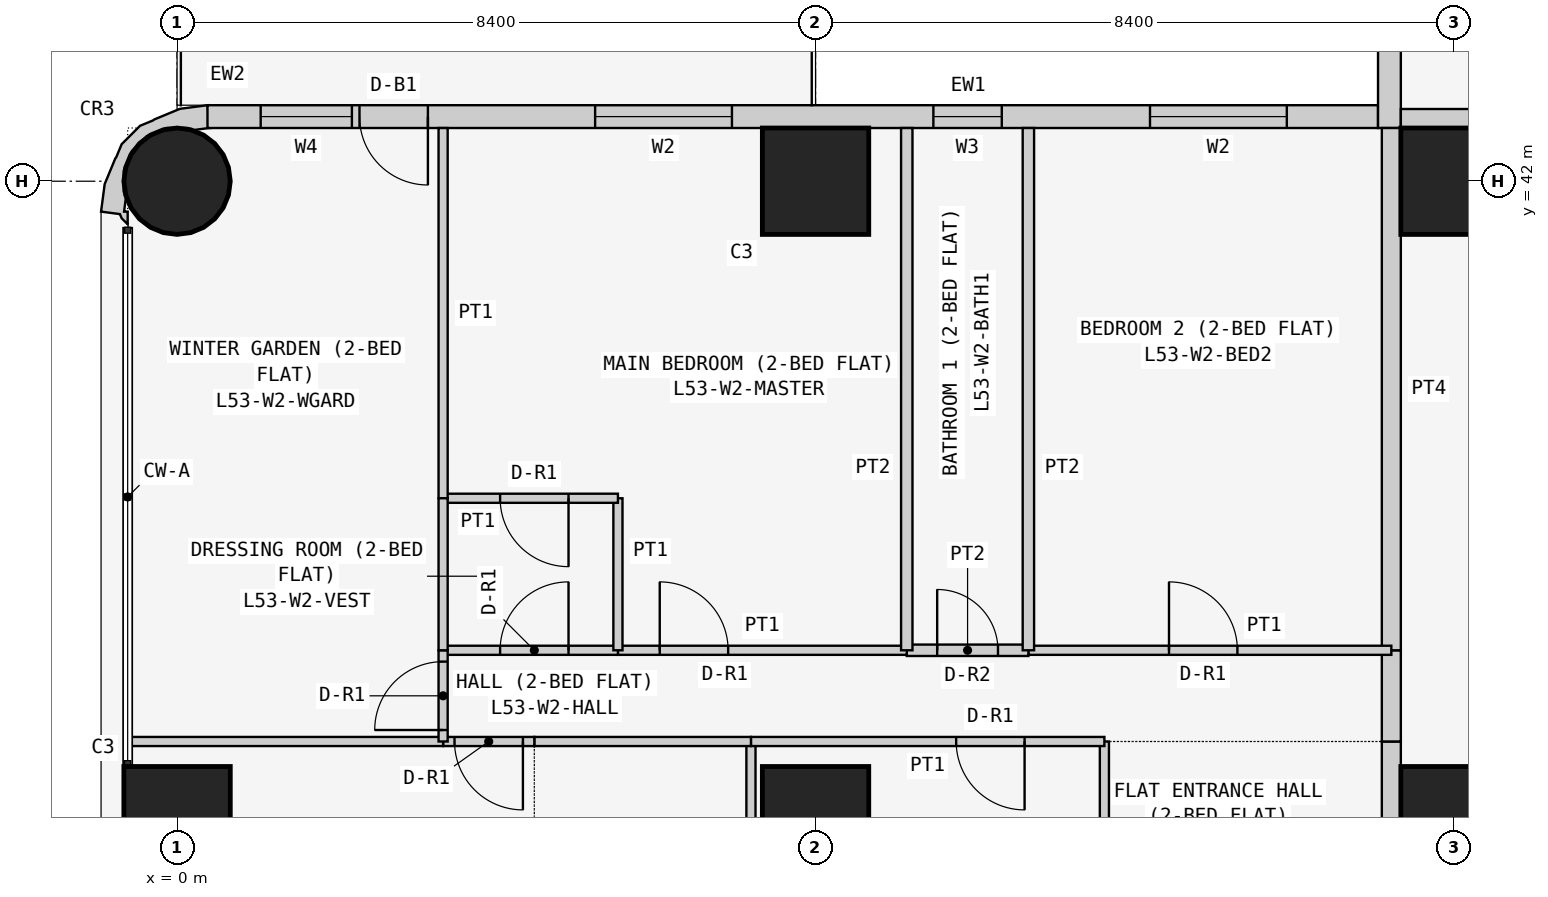
"""IFC4 building model, lengths in metres.
Left out: names, types, materials, properties, quantities, classifications, styles, units other than length and angle.
Written with IfcOpenShell. Run it as: python <this file> out.ifc"""

import sys

from ifc_helpers import new_model, si_unit, direction, frame, frame_2d, origin, origin_2d, place, context, subcontext, project, spatial, polyline, rectangle, circle, outline, extrude, element, fill, save


model = new_model("IFC4")
c1 = context("Model", 3, precision=1e-05, world=origin(), true_north=direction((0.0, 1.0)))
c2 = subcontext(c1, "Body", "Model", "MODEL_VIEW")
j1 = project(units=[si_unit("LENGTHUNIT", "METRE"), si_unit("PLANEANGLEUNIT", "RADIAN")], contexts=[c1])
p1 = place(None, origin())
s1 = spatial("IfcSite", under=j1, at=p1, CompositionType="ELEMENT")
p2 = place(p1, origin())
s2 = spatial("IfcBuilding", under=s1, at=p2, CompositionType="ELEMENT")
p3 = place(p2, frame((0.0, 0.0, 204.9)))
s3 = spatial("IfcBuildingStorey", under=s2, at=p3, CompositionType="ELEMENT", Elevation=204.9)
p4 = place(p3, frame((0.0, 33.6, 0.0), z_axis=(0.0, 0.0, 1.0), x_axis=(1.0, 0.0, 0.0)))
e1 = element("IfcColumn", 1, at=p4, inside=s3, PredefinedType="COLUMN", context=c2, shape_type="SweptSolid", body=[
    extrude(rectangle(XDim=1.4, YDim=1.4, at=origin_2d()), origin(), (0.0, 0.0, 1.0), 3.6),
])
p5 = place(p3, frame((0.0, 42.0, 0.0), z_axis=(0.0, 0.0, 1.0), x_axis=(1.0, 0.0, 0.0)))
e2 = element("IfcColumn", 2, at=p5, inside=s3, PredefinedType="COLUMN", context=c2, shape_type="SweptSolid", body=[
    extrude(circle(Radius=0.7, at=origin_2d()), origin(), (0.0, 0.0, 1.0), 3.6),
])
for number, where, z_axis, x_axis in (
    (3, (8.4, 33.6, 0.0), (0.0, 0.0, 1.0), (1.0, 0.0, 0.0)),
    (4, (8.4, 42.0, 0.0), (0.0, 0.0, 1.0), (1.0, 0.0, 0.0)),
    (5, (16.8, 33.6, 0.0), (0.0, 0.0, 1.0), (1.0, 0.0, 0.0)),
    (6, (16.8, 42.0, 0.0), (0.0, 0.0, 1.0), (1.0, 0.0, 0.0)),
):
    element("IfcColumn", number, at=place(p3, frame(where, z_axis=z_axis, x_axis=x_axis)), inside=s3, PredefinedType="COLUMN", context=c2, shape_type="SweptSolid", body=[
        extrude(rectangle(XDim=1.4, YDim=1.4, at=origin_2d()), origin(), (0.0, 0.0, 1.0), 3.6),
    ])
p6 = place(p3, frame((15.8, 42.85, 0.0), z_axis=(0.0, 0.0, 1.0), x_axis=(-1.0, 0.0, 0.0)))
e7 = element("IfcWall", 7, at=p6, inside=s3, PredefinedType="SOLIDWALL", context=c2, shape_type="SweptSolid", body=[
    extrude(rectangle(XDim=15.4, YDim=0.3, at=frame_2d((7.7, 0.0))), origin(), (0.0, 0.0, 1.0), 3.45),
])
p7 = place(p6, frame((1.2, 0.0, 0.9)))
e8 = element("IfcOpeningElement", 8, at=p7, cuts=e7, PredefinedType="OPENING", context=c2, shape_type="SweptSolid", body=[
    extrude(rectangle(XDim=1.8, YDim=1.5, at=frame_2d((0.9, 0.75))), frame((0.0, 0.16, 0.0), z_axis=(0.0, -1.0, 0.0), x_axis=(1.0, 0.0, 0.0)), (0.0, 0.0, 1.0), 0.32),
])
p8 = place(p6, frame((4.95, 0.0, 1.5)))
e9 = element("IfcOpeningElement", 9, at=p8, cuts=e7, PredefinedType="OPENING", context=c2, shape_type="SweptSolid", body=[
    extrude(rectangle(XDim=0.9, YDim=0.7, at=frame_2d((0.45, 0.35))), frame((0.0, 0.16, 0.0), z_axis=(0.0, -1.0, 0.0), x_axis=(1.0, 0.0, 0.0)), (0.0, 0.0, 1.0), 0.32),
])
p9 = place(p6, frame((8.5, 0.0, 0.9)))
e10 = element("IfcOpeningElement", 10, at=p9, cuts=e7, PredefinedType="OPENING", context=c2, shape_type="SweptSolid", body=[
    extrude(rectangle(XDim=1.8, YDim=1.5, at=frame_2d((0.9, 0.75))), frame((0.0, 0.16, 0.0), z_axis=(0.0, -1.0, 0.0), x_axis=(1.0, 0.0, 0.0)), (0.0, 0.0, 1.0), 0.32),
])
p10 = place(p6, frame((12.5, 0.0, 0.0)))
e11 = element("IfcOpeningElement", 11, at=p10, cuts=e7, PredefinedType="OPENING", context=c2, shape_type="SweptSolid", body=[
    extrude(rectangle(XDim=0.9, YDim=2.4, at=frame_2d((0.45, 1.2))), frame((0.0, 0.16, 0.0), z_axis=(0.0, -1.0, 0.0), x_axis=(1.0, 0.0, 0.0)), (0.0, 0.0, 1.0), 0.32),
])
p11 = place(p6, frame((13.5, 0.0, 0.9)))
e12 = element("IfcOpeningElement", 12, at=p11, cuts=e7, PredefinedType="OPENING", context=c2, shape_type="SweptSolid", body=[
    extrude(rectangle(XDim=1.2, YDim=1.5, at=frame_2d((0.6, 0.75))), frame((0.0, 0.16, 0.0), z_axis=(0.0, -1.0, 0.0), x_axis=(1.0, 0.0, 0.0)), (0.0, 0.0, 1.0), 0.32),
])
p12 = place(p3, frame((15.95, 50.0, 0.0), z_axis=(0.0, 0.0, 1.0), x_axis=(0.0, -1.0, 0.0)))
e13 = element("IfcWall", 13, at=p12, inside=s3, PredefinedType="SOLIDWALL", context=c2, shape_type="SweptSolid", body=[
    extrude(rectangle(XDim=7.3, YDim=0.3, at=frame_2d((3.65, 0.0))), origin(), (0.0, 0.0, 1.0), 3.45),
])
p13 = place(p12, frame((3.1, 0.0, 0.9)))
e14 = element("IfcOpeningElement", 14, at=p13, cuts=e13, PredefinedType="OPENING", context=c2, shape_type="SweptSolid", body=[
    extrude(rectangle(XDim=2.4, YDim=1.5, at=frame_2d((1.2, 0.75))), frame((0.0, 0.16, 0.0), z_axis=(0.0, -1.0, 0.0), x_axis=(1.0, 0.0, 0.0)), (0.0, 0.0, 1.0), 0.32),
])
p14 = place(p12, frame((0.75, 0.0, 0.9)))
e15 = element("IfcOpeningElement", 15, at=p14, cuts=e13, PredefinedType="OPENING", context=c2, shape_type="SweptSolid", body=[
    extrude(rectangle(XDim=1.2, YDim=1.5, at=frame_2d((0.6, 0.75))), frame((0.0, 0.16, 0.0), z_axis=(0.0, -1.0, 0.0), x_axis=(1.0, 0.0, 0.0)), (0.0, 0.0, 1.0), 0.32),
])
p15 = place(p3, frame((0.29, 42.724, 0.0), z_axis=(0.0, 0.0, 1.0), x_axis=(-0.898030234854, 0.439933741929, 0.0)))
e16 = element("IfcWall", 16, at=p15, inside=s3, PredefinedType="SOLIDWALL", context=c2, shape_type="SweptSolid", body=[
    extrude(outline(polyline([(-0.145, -0.044), (0.022, -0.296), (0.327, -0.094), (0.568, 0.18), (0.578, 0.199), (0.7, 0.338), (0.811, 0.661), (0.799, 0.846), (0.803, 0.866), (0.78, 1.231), (0.664, 1.577), (0.426, 1.497), (0.382, 1.536), (0.276, 1.572), (0.349, 1.423), (0.392, 1.444), (0.453, 1.261), (0.51, 1.211), (0.632, 0.961), (0.65, 0.683), (0.56, 0.419), (0.375, 0.21), (0.125, 0.087), (0.05, 0.082), (-0.127, -0.035), (-0.145, -0.044)])), origin(), (0.0, 0.0, 1.0), 3.45),
])
p16 = place(p3, frame((16.1, 42.825, 0.0), z_axis=(0.0, 0.0, 1.0), x_axis=(1.0, 0.0, 0.0)))
e17 = element("IfcWall", 17, at=p16, inside=s3, PredefinedType="PARTITIONING", context=c2, shape_type="SweptSolid", body=[
    extrude(rectangle(XDim=6.871, YDim=0.25, at=frame_2d((3.436, 0.0))), origin(), (0.0, 0.0, 1.0), 3.45),
])
p17 = place(p3, frame((15.975, 29.4, 0.0), z_axis=(0.0, 0.0, 1.0), x_axis=(0.0, 1.0, 0.0)))
e18 = element("IfcWall", 18, at=p17, inside=s3, PredefinedType="PARTITIONING", context=c2, shape_type="SweptSolid", body=[
    extrude(rectangle(XDim=5.229, YDim=0.25, at=frame_2d((2.615, 0.0))), origin(), (0.0, 0.0, 1.0), 3.45),
])
p18 = place(p17, frame((2.1, 0.0, 0.0)))
e19 = element("IfcOpeningElement", 19, at=p18, cuts=e18, PredefinedType="OPENING", context=c2, shape_type="SweptSolid", body=[
    extrude(rectangle(XDim=1.0, YDim=2.1, at=frame_2d((0.5, 1.05))), frame((0.0, 0.135, 0.0), z_axis=(0.0, -1.0, 0.0), x_axis=(1.0, 0.0, 0.0)), (0.0, 0.0, 1.0), 0.27),
])
p19 = place(p3, frame((15.975, 34.629, 0.0), z_axis=(0.0, 0.0, 1.0), x_axis=(0.0, 1.0, 0.0)))
e20 = element("IfcWall", 20, at=p19, inside=s3, PredefinedType="PARTITIONING", context=c2, shape_type="SweptSolid", body=[
    extrude(rectangle(XDim=1.2, YDim=0.25, at=frame_2d((0.6, 0.0))), origin(), (0.0, 0.0, 1.0), 3.45),
])
p20 = place(p3, frame((15.975, 35.829, 0.0), z_axis=(0.0, 0.0, 1.0), x_axis=(0.0, 1.0, 0.0)))
e21 = element("IfcWall", 21, at=p20, inside=s3, PredefinedType="PARTITIONING", context=c2, shape_type="SweptSolid", body=[
    extrude(rectangle(XDim=6.871, YDim=0.25, at=frame_2d((3.436, 0.0))), origin(), (0.0, 0.0, 1.0), 3.45),
])
for number, where, z_axis, x_axis in (
    (22, (12.2, 29.4, 0.0), (0.0, 0.0, 1.0), (0.0, 1.0, 0.0)),
    (23, (7.55, 29.4, 0.0), (0.0, 0.0, 1.0), (0.0, 1.0, 0.0)),
):
    element("IfcWall", number, at=place(p3, frame(where, z_axis=z_axis, x_axis=x_axis)), inside=s3, PredefinedType="PARTITIONING", context=c2, shape_type="SweptSolid", body=[
        extrude(rectangle(XDim=5.229, YDim=0.12, at=frame_2d((2.615, 0.0))), origin(), (0.0, 0.0, 1.0), 3.45),
    ])
p21 = place(p3, frame((7.55, 34.629, 0.0), z_axis=(0.0, 0.0, 1.0), x_axis=(1.0, 0.0, 0.0)))
e24 = element("IfcWall", 24, at=p21, inside=s3, PredefinedType="PARTITIONING", context=c2, shape_type="SweptSolid", body=[
    extrude(rectangle(XDim=4.65, YDim=0.12, at=frame_2d((2.325, 0.0))), origin(), (0.0, 0.0, 1.0), 3.45),
])
p22 = place(p21, frame((2.7, 0.0, 0.0)))
e25 = element("IfcOpeningElement", 25, at=p22, cuts=e24, PredefinedType="OPENING", context=c2, shape_type="SweptSolid", body=[
    extrude(rectangle(XDim=0.9, YDim=2.1, at=frame_2d((0.45, 1.05))), frame((0.0, 0.07, 0.0), z_axis=(0.0, -1.0, 0.0), x_axis=(1.0, 0.0, 0.0)), (0.0, 0.0, 1.0), 0.14),
])
p23 = place(p3, frame((4.7, 34.629, 0.0), z_axis=(0.0, 0.0, 1.0), x_axis=(1.0, 0.0, 0.0)))
e26 = element("IfcWall", 26, at=p23, inside=s3, PredefinedType="PARTITIONING", context=c2, shape_type="SweptSolid", body=[
    extrude(rectangle(XDim=2.85, YDim=0.12, at=frame_2d((1.425, 0.0))), origin(), (0.0, 0.0, 1.0), 3.45),
])
p24 = place(p3, frame((3.5, 34.629, 0.0), z_axis=(0.0, 0.0, 1.0), x_axis=(1.0, 0.0, 0.0)))
e27 = element("IfcWall", 27, at=p24, inside=s3, PredefinedType="PARTITIONING", context=c2, shape_type="SweptSolid", body=[
    extrude(rectangle(XDim=1.2, YDim=0.12, at=frame_2d((0.6, 0.0))), origin(), (0.0, 0.0, 1.0), 3.45),
])
p25 = place(p24, frame((0.15, 0.0, 0.0)))
e28 = element("IfcOpeningElement", 28, at=p25, cuts=e27, PredefinedType="OPENING", context=c2, shape_type="SweptSolid", body=[
    extrude(rectangle(XDim=0.9, YDim=2.1, at=frame_2d((0.45, 1.05))), frame((0.0, 0.07, 0.0), z_axis=(0.0, -1.0, 0.0), x_axis=(1.0, 0.0, 0.0)), (0.0, 0.0, 1.0), 0.14),
])
p26 = place(p3, frame((-0.65, 34.629, 0.0), z_axis=(0.0, 0.0, 1.0), x_axis=(1.0, 0.0, 0.0)))
e29 = element("IfcWall", 29, at=p26, inside=s3, PredefinedType="PARTITIONING", context=c2, shape_type="SweptSolid", body=[
    extrude(rectangle(XDim=4.15, YDim=0.12, at=frame_2d((2.075, 0.0))), origin(), (0.0, 0.0, 1.0), 3.45),
])
p27 = place(p3, frame((11.2, 35.829, 0.0), z_axis=(0.0, 0.0, 1.0), x_axis=(1.0, 0.0, 0.0)))
e30 = element("IfcWall", 30, at=p27, inside=s3, PredefinedType="PARTITIONING", context=c2, shape_type="SweptSolid", body=[
    extrude(rectangle(XDim=4.775, YDim=0.12, at=frame_2d((2.388, 0.0))), origin(), (0.0, 0.0, 1.0), 3.45),
])
p28 = place(p27, frame((1.85, 0.0, 0.0)))
e31 = element("IfcOpeningElement", 31, at=p28, cuts=e30, PredefinedType="OPENING", context=c2, shape_type="SweptSolid", body=[
    extrude(rectangle(XDim=0.9, YDim=2.1, at=frame_2d((0.45, 1.05))), frame((0.0, 0.07, 0.0), z_axis=(0.0, -1.0, 0.0), x_axis=(1.0, 0.0, 0.0)), (0.0, 0.0, 1.0), 0.14),
])
p29 = place(p3, frame((9.6, 35.829, 0.0), z_axis=(0.0, 0.0, 1.0), x_axis=(1.0, 0.0, 0.0)))
e32 = element("IfcWall", 32, at=p29, inside=s3, PredefinedType="PARTITIONING", context=c2, shape_type="SweptSolid", body=[
    extrude(rectangle(XDim=1.6, YDim=0.15, at=frame_2d((0.8, 0.0))), origin(), (0.0, 0.0, 1.0), 3.45),
])
p30 = place(p29, frame((0.4, 0.0, 0.0)))
e33 = element("IfcOpeningElement", 33, at=p30, cuts=e32, PredefinedType="OPENING", context=c2, shape_type="SweptSolid", body=[
    extrude(rectangle(XDim=0.8, YDim=2.1, at=frame_2d((0.4, 1.05))), frame((0.0, 0.085, 0.0), z_axis=(0.0, -1.0, 0.0), x_axis=(1.0, 0.0, 0.0)), (0.0, 0.0, 1.0), 0.17),
])
p31 = place(p3, frame((5.8, 35.829, 0.0), z_axis=(0.0, 0.0, 1.0), x_axis=(1.0, 0.0, 0.0)))
e34 = element("IfcWall", 34, at=p31, inside=s3, PredefinedType="PARTITIONING", context=c2, shape_type="SweptSolid", body=[
    extrude(rectangle(XDim=3.8, YDim=0.12, at=frame_2d((1.9, 0.0))), origin(), (0.0, 0.0, 1.0), 3.45),
])
p32 = place(p31, frame((0.55, 0.0, 0.0)))
e35 = element("IfcOpeningElement", 35, at=p32, cuts=e34, PredefinedType="OPENING", context=c2, shape_type="SweptSolid", body=[
    extrude(rectangle(XDim=0.9, YDim=2.1, at=frame_2d((0.45, 1.05))), frame((0.0, 0.07, 0.0), z_axis=(0.0, -1.0, 0.0), x_axis=(1.0, 0.0, 0.0)), (0.0, 0.0, 1.0), 0.14),
])
p33 = place(p3, frame((3.5, 35.829, 0.0), z_axis=(0.0, 0.0, 1.0), x_axis=(1.0, 0.0, 0.0)))
e36 = element("IfcWall", 36, at=p33, inside=s3, PredefinedType="PARTITIONING", context=c2, shape_type="SweptSolid", body=[
    extrude(rectangle(XDim=2.3, YDim=0.12, at=frame_2d((1.15, 0.0))), origin(), (0.0, 0.0, 1.0), 3.45),
])
p34 = place(p33, frame((0.75, 0.0, 0.0)))
e37 = element("IfcOpeningElement", 37, at=p34, cuts=e36, PredefinedType="OPENING", context=c2, shape_type="SweptSolid", body=[
    extrude(rectangle(XDim=0.9, YDim=2.1, at=frame_2d((0.45, 1.05))), frame((0.0, 0.07, 0.0), z_axis=(0.0, -1.0, 0.0), x_axis=(1.0, 0.0, 0.0)), (0.0, 0.0, 1.0), 0.14),
])
p35 = place(p3, frame((3.5, 34.629, 0.0), z_axis=(0.0, 0.0, 1.0), x_axis=(0.0, 1.0, 0.0)))
e38 = element("IfcWall", 38, at=p35, inside=s3, PredefinedType="PARTITIONING", context=c2, shape_type="SweptSolid", body=[
    extrude(rectangle(XDim=1.2, YDim=0.12, at=frame_2d((0.6, 0.0))), origin(), (0.0, 0.0, 1.0), 3.45),
])
p36 = place(p35, frame((0.151, 0.0, 0.0)))
e39 = element("IfcOpeningElement", 39, at=p36, cuts=e38, PredefinedType="OPENING", context=c2, shape_type="SweptSolid", body=[
    extrude(rectangle(XDim=0.9, YDim=2.1, at=frame_2d((0.45, 1.05))), frame((0.0, 0.07, 0.0), z_axis=(0.0, -1.0, 0.0), x_axis=(1.0, 0.0, 0.0)), (0.0, 0.0, 1.0), 0.14),
])
for number, where, z_axis, x_axis in (
    (40, (11.2, 35.829, 0.0), (0.0, 0.0, 1.0), (0.0, 1.0, 0.0)),
    (41, (9.6, 35.829, 0.0), (0.0, 0.0, 1.0), (0.0, 1.0, 0.0)),
):
    element("IfcWall", number, at=place(p3, frame(where, z_axis=z_axis, x_axis=x_axis)), inside=s3, PredefinedType="PARTITIONING", context=c2, shape_type="SweptSolid", body=[
        extrude(rectangle(XDim=6.871, YDim=0.15, at=frame_2d((3.436, 0.0))), origin(), (0.0, 0.0, 1.0), 3.45),
    ])
p37 = place(p3, frame((5.8, 35.829, 0.0), z_axis=(0.0, 0.0, 1.0), x_axis=(0.0, 1.0, 0.0)))
e42 = element("IfcWall", 42, at=p37, inside=s3, PredefinedType="PARTITIONING", context=c2, shape_type="SweptSolid", body=[
    extrude(rectangle(XDim=2.0, YDim=0.12, at=frame_2d((1.0, 0.0))), origin(), (0.0, 0.0, 1.0), 3.45),
])
p38 = place(p3, frame((5.8, 37.829, 0.0), z_axis=(0.0, 0.0, 1.0), x_axis=(-1.0, 0.0, 0.0)))
e43 = element("IfcWall", 43, at=p38, inside=s3, PredefinedType="PARTITIONING", context=c2, shape_type="SweptSolid", body=[
    extrude(rectangle(XDim=2.3, YDim=0.12, at=frame_2d((1.15, 0.0))), origin(), (0.0, 0.0, 1.0), 3.45),
])
p39 = place(p38, frame((0.65, 0.0, 0.0)))
e44 = element("IfcOpeningElement", 44, at=p39, cuts=e43, PredefinedType="OPENING", context=c2, shape_type="SweptSolid", body=[
    extrude(rectangle(XDim=0.9, YDim=2.1, at=frame_2d((0.45, 1.05))), frame((0.0, 0.07, 0.0), z_axis=(0.0, -1.0, 0.0), x_axis=(1.0, 0.0, 0.0)), (0.0, 0.0, 1.0), 0.14),
])
p40 = place(p3, frame((3.5, 37.829, 0.0), z_axis=(0.0, 0.0, 1.0), x_axis=(0.0, 1.0, 0.0)))
e45 = element("IfcWall", 45, at=p40, inside=s3, PredefinedType="PARTITIONING", context=c2, shape_type="SweptSolid", body=[
    extrude(rectangle(XDim=4.871, YDim=0.12, at=frame_2d((2.436, 0.0))), origin(), (0.0, 0.0, 1.0), 3.45),
])
p41 = place(p3, frame((3.5, 35.829, 0.0), z_axis=(0.0, 0.0, 1.0), x_axis=(0.0, 1.0, 0.0)))
e46 = element("IfcWall", 46, at=p41, inside=s3, PredefinedType="PARTITIONING", context=c2, shape_type="SweptSolid", body=[
    extrude(rectangle(XDim=2.0, YDim=0.12, at=frame_2d((1.0, 0.0))), origin(), (0.0, 0.0, 1.0), 3.45),
])
p42 = place(p7, origin())
e47 = element("IfcWindow", 47, at=p42, inside=s3, PartitioningType="SINGLE_PANEL", PredefinedType="WINDOW", context=c2, shape_type="SweptSolid", body=[
    extrude(rectangle(XDim=1.8, YDim=1.5, at=frame_2d((0.9, 0.75))), frame((0.0, 0.03, 0.0), z_axis=(0.0, -1.0, 0.0), x_axis=(1.0, 0.0, 0.0)), (0.0, 0.0, 1.0), 0.06),
])
fill(e8, e47)
p43 = place(p8, origin())
e48 = element("IfcWindow", 48, at=p43, inside=s3, PartitioningType="SINGLE_PANEL", PredefinedType="WINDOW", context=c2, shape_type="SweptSolid", body=[
    extrude(rectangle(XDim=0.9, YDim=0.7, at=frame_2d((0.45, 0.35))), frame((0.0, 0.03, 0.0), z_axis=(0.0, -1.0, 0.0), x_axis=(1.0, 0.0, 0.0)), (0.0, 0.0, 1.0), 0.06),
])
fill(e9, e48)
p44 = place(p9, origin())
e49 = element("IfcWindow", 49, at=p44, inside=s3, PartitioningType="SINGLE_PANEL", PredefinedType="WINDOW", context=c2, shape_type="SweptSolid", body=[
    extrude(rectangle(XDim=1.8, YDim=1.5, at=frame_2d((0.9, 0.75))), frame((0.0, 0.03, 0.0), z_axis=(0.0, -1.0, 0.0), x_axis=(1.0, 0.0, 0.0)), (0.0, 0.0, 1.0), 0.06),
])
fill(e10, e49)
p45 = place(p10, origin())
e50 = element("IfcDoor", 50, at=p45, inside=s3, OperationType="SINGLE_SWING_LEFT", PredefinedType="DOOR", context=c2, shape_type="SweptSolid", body=[
    extrude(rectangle(XDim=0.9, YDim=2.4, at=frame_2d((0.45, 1.2))), frame((0.0, 0.025, 0.0), z_axis=(0.0, -1.0, 0.0), x_axis=(1.0, 0.0, 0.0)), (0.0, 0.0, 1.0), 0.05),
])
fill(e11, e50)
p46 = place(p11, origin())
e51 = element("IfcWindow", 51, at=p46, inside=s3, PartitioningType="SINGLE_PANEL", PredefinedType="WINDOW", context=c2, shape_type="SweptSolid", body=[
    extrude(rectangle(XDim=1.2, YDim=1.5, at=frame_2d((0.6, 0.75))), frame((0.0, 0.03, 0.0), z_axis=(0.0, -1.0, 0.0), x_axis=(1.0, 0.0, 0.0)), (0.0, 0.0, 1.0), 0.06),
])
fill(e12, e51)
p47 = place(p22, frame((0.9, 0.0, 0.0), z_axis=(0.0, 0.0, 1.0), x_axis=(-1.0, 0.0, 0.0)))
e52 = element("IfcDoor", 52, at=p47, inside=s3, OperationType="SINGLE_SWING_LEFT", PredefinedType="DOOR", context=c2, shape_type="SweptSolid", body=[
    extrude(rectangle(XDim=0.9, YDim=2.1, at=frame_2d((0.45, 1.05))), frame((0.0, 0.025, 0.0), z_axis=(0.0, -1.0, 0.0), x_axis=(1.0, 0.0, 0.0)), (0.0, 0.0, 1.0), 0.05),
])
fill(e25, e52)
p48 = place(p25, frame((0.9, 0.0, 0.0), z_axis=(0.0, 0.0, 1.0), x_axis=(-1.0, 0.0, 0.0)))
e53 = element("IfcDoor", 53, at=p48, inside=s3, OperationType="SINGLE_SWING_LEFT", PredefinedType="DOOR", context=c2, shape_type="SweptSolid", body=[
    extrude(rectangle(XDim=0.9, YDim=2.1, at=frame_2d((0.45, 1.05))), frame((0.0, 0.025, 0.0), z_axis=(0.0, -1.0, 0.0), x_axis=(1.0, 0.0, 0.0)), (0.0, 0.0, 1.0), 0.05),
])
fill(e28, e53)
p49 = place(p28, origin())
e54 = element("IfcDoor", 54, at=p49, inside=s3, OperationType="SINGLE_SWING_LEFT", PredefinedType="DOOR", context=c2, shape_type="SweptSolid", body=[
    extrude(rectangle(XDim=0.9, YDim=2.1, at=frame_2d((0.45, 1.05))), frame((0.0, 0.025, 0.0), z_axis=(0.0, -1.0, 0.0), x_axis=(1.0, 0.0, 0.0)), (0.0, 0.0, 1.0), 0.05),
])
fill(e31, e54)
p50 = place(p30, origin())
e55 = element("IfcDoor", 55, at=p50, inside=s3, OperationType="SINGLE_SWING_LEFT", PredefinedType="DOOR", context=c2, shape_type="SweptSolid", body=[
    extrude(rectangle(XDim=0.8, YDim=2.1, at=frame_2d((0.4, 1.05))), frame((0.0, 0.025, 0.0), z_axis=(0.0, -1.0, 0.0), x_axis=(1.0, 0.0, 0.0)), (0.0, 0.0, 1.0), 0.05),
])
fill(e33, e55)
p51 = place(p32, origin())
e56 = element("IfcDoor", 56, at=p51, inside=s3, OperationType="SINGLE_SWING_LEFT", PredefinedType="DOOR", context=c2, shape_type="SweptSolid", body=[
    extrude(rectangle(XDim=0.9, YDim=2.1, at=frame_2d((0.45, 1.05))), frame((0.0, 0.025, 0.0), z_axis=(0.0, -1.0, 0.0), x_axis=(1.0, 0.0, 0.0)), (0.0, 0.0, 1.0), 0.05),
])
fill(e35, e56)
p52 = place(p34, origin())
e57 = element("IfcDoor", 57, at=p52, inside=s3, OperationType="SINGLE_SWING_RIGHT", PredefinedType="DOOR", context=c2, shape_type="SweptSolid", body=[
    extrude(rectangle(XDim=0.9, YDim=2.1, at=frame_2d((0.45, 1.05))), frame((0.0, 0.025, 0.0), z_axis=(0.0, -1.0, 0.0), x_axis=(1.0, 0.0, 0.0)), (0.0, 0.0, 1.0), 0.05),
])
fill(e37, e57)
p53 = place(p39, origin())
e58 = element("IfcDoor", 58, at=p53, inside=s3, OperationType="SINGLE_SWING_LEFT", PredefinedType="DOOR", context=c2, shape_type="SweptSolid", body=[
    extrude(rectangle(XDim=0.9, YDim=2.1, at=frame_2d((0.45, 1.05))), frame((0.0, 0.025, 0.0), z_axis=(0.0, -1.0, 0.0), x_axis=(1.0, 0.0, 0.0)), (0.0, 0.0, 1.0), 0.05),
])
fill(e44, e58)
p54 = place(p36, origin())
e59 = element("IfcDoor", 59, at=p54, inside=s3, OperationType="SINGLE_SWING_LEFT", PredefinedType="DOOR", context=c2, shape_type="SweptSolid", body=[
    extrude(rectangle(XDim=0.9, YDim=2.1, at=frame_2d((0.45, 1.05))), frame((0.0, 0.025, 0.0), z_axis=(0.0, -1.0, 0.0), x_axis=(1.0, 0.0, 0.0)), (0.0, 0.0, 1.0), 0.05),
])
fill(e39, e59)
save(model, sys.argv[1])
